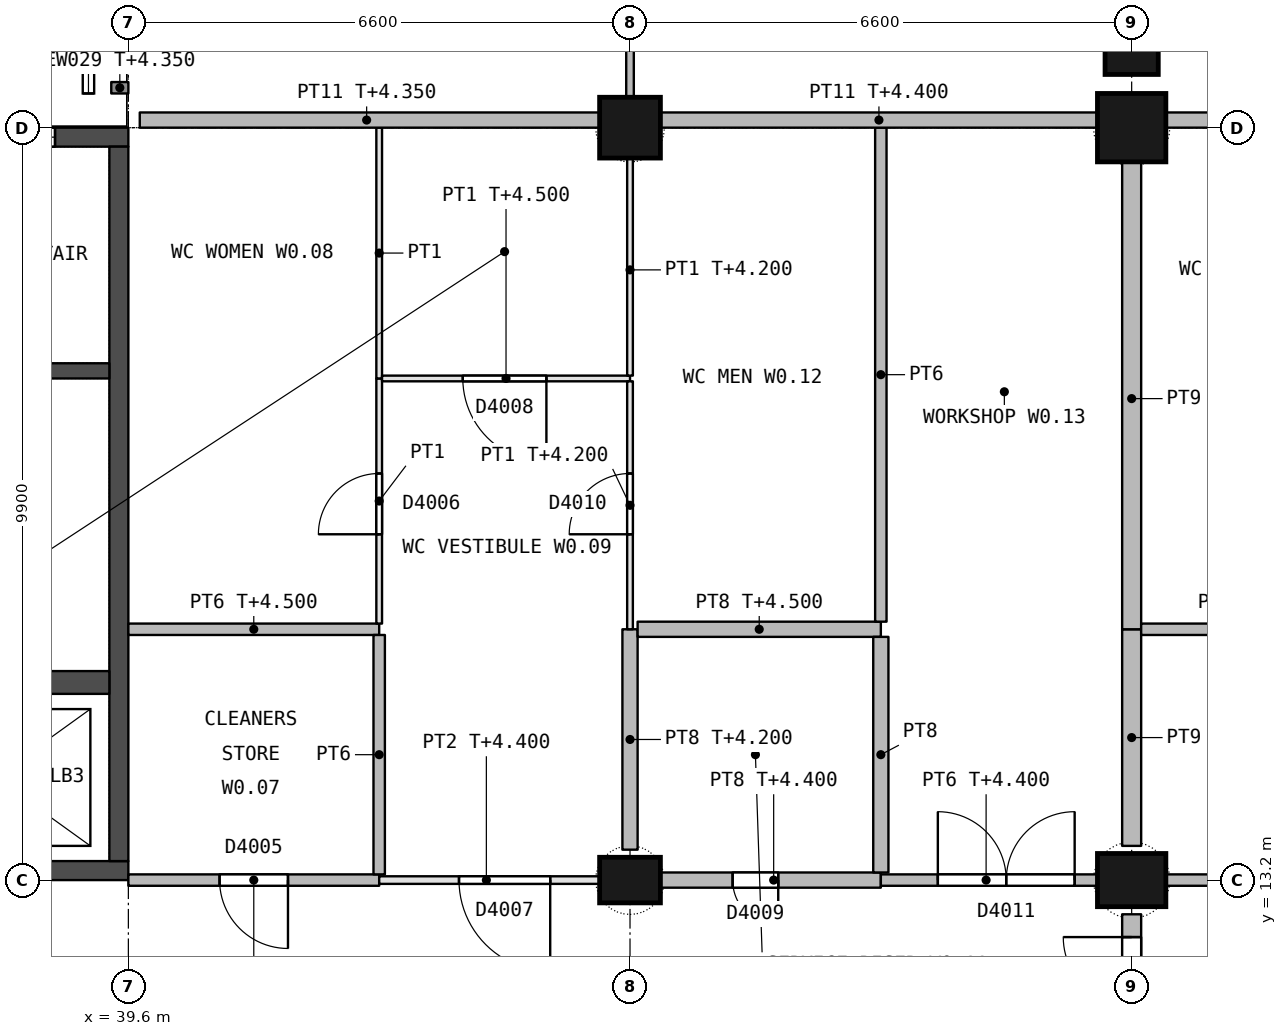
"""IFC4 building model, lengths in metres.
Left out: names, types, materials, properties, quantities, classifications, styles, units other than length and angle.
Written with IfcOpenShell. Run it as: python <this file> out.ifc"""

import sys

from ifc_helpers import new_model, si_unit, direction, frame, frame_2d, origin, origin_2d, place, context, subcontext, project, spatial, rectangle, extrude, element, fill, save


model = new_model("IFC4")
c1 = context("Model", 3, precision=1e-05, world=origin(), true_north=direction((0.0, 1.0)))
c2 = subcontext(c1, "Body", "Model", "MODEL_VIEW")
j1 = project(units=[si_unit("LENGTHUNIT", "METRE"), si_unit("PLANEANGLEUNIT", "RADIAN")], contexts=[c1])
p1 = place(None, origin())
s1 = spatial("IfcSite", under=j1, at=p1, CompositionType="ELEMENT")
p2 = place(p1, origin())
s2 = spatial("IfcBuilding", under=s1, at=p2, CompositionType="ELEMENT")
p3 = place(p2, origin())
s3 = spatial("IfcBuildingStorey", under=s2, at=p3, CompositionType="ELEMENT", Elevation=0.0)
p4 = place(p3, frame((46.2, 13.2, 0.0), z_axis=(0.0, 0.0, 1.0), x_axis=(1.0, 0.0, 0.0)))
e1 = element("IfcColumn", 1, at=p4, inside=s3, PredefinedType="COLUMN", context=c2, shape_type="SweptSolid", body=[
    extrude(rectangle(XDim=0.8, YDim=0.6, at=origin_2d()), origin(), (0.0, 0.0, 1.0), 5.4),
])
p5 = place(p3, frame((46.2, 23.1, 0.0), z_axis=(0.0, 0.0, 1.0), x_axis=(1.0, 0.0, 0.0)))
e2 = element("IfcColumn", 2, at=p5, inside=s3, PredefinedType="COLUMN", context=c2, shape_type="SweptSolid", body=[
    extrude(rectangle(XDim=0.8, YDim=0.8, at=origin_2d()), origin(), (0.0, 0.0, 1.0), 5.4),
])
p6 = place(p3, frame((52.8, 13.2, 0.0), z_axis=(0.0, 0.0, 1.0), x_axis=(1.0, 0.0, 0.0)))
e3 = element("IfcColumn", 3, at=p6, inside=s3, PredefinedType="COLUMN", context=c2, shape_type="SweptSolid", body=[
    extrude(rectangle(XDim=0.9, YDim=0.7, at=origin_2d()), origin(), (0.0, 0.0, 1.0), 5.4),
])
p7 = place(p3, frame((52.8, 23.1, 0.0), z_axis=(0.0, 0.0, 1.0), x_axis=(1.0, 0.0, 0.0)))
e4 = element("IfcColumn", 4, at=p7, inside=s3, PredefinedType="COLUMN", context=c2, shape_type="SweptSolid", body=[
    extrude(rectangle(XDim=0.9, YDim=0.9, at=origin_2d()), origin(), (0.0, 0.0, 1.0), 5.4),
])
p8 = place(p3, frame((52.8, 24.15, 0.0), z_axis=(0.0, 0.0, 1.0), x_axis=(1.0, 0.0, 0.0)))
e5 = element("IfcColumn", 5, at=p8, inside=s3, PredefinedType="COLUMN", context=c2, shape_type="SweptSolid", body=[
    extrude(rectangle(XDim=0.7, YDim=0.7, at=origin_2d()), origin(), (0.0, 0.0, 1.0), 5.4),
])
p9 = place(p3, frame((33.0, 13.325, 0.0), z_axis=(0.0, 0.0, 1.0), x_axis=(1.0, 0.0, 0.0)))
e6 = element("IfcWall", 6, at=p9, inside=s3, PredefinedType="SHEAR", context=c2, shape_type="SweptSolid", body=[
    extrude(rectangle(XDim=6.6, YDim=0.25, at=frame_2d((3.3, 0.0))), origin(), (0.0, 0.0, 1.0), 5.1),
])
p10 = place(p9, frame((0.95, 0.0, 0.0)))
e7 = element("IfcOpeningElement", 7, at=p10, cuts=e6, PredefinedType="OPENING", context=c2, shape_type="SweptSolid", body=[
    extrude(rectangle(XDim=1.1, YDim=2.1, at=frame_2d((0.55, 1.05))), frame((0.0, 0.135, 0.0), z_axis=(0.0, -1.0, 0.0), x_axis=(1.0, 0.0, 0.0)), (0.0, 0.0, 1.0), 0.27),
])
p11 = place(p3, frame((33.0, 22.975, 0.0), z_axis=(0.0, 0.0, 1.0), x_axis=(1.0, 0.0, 0.0)))
e8 = element("IfcWall", 8, at=p11, inside=s3, PredefinedType="SHEAR", context=c2, shape_type="SweptSolid", body=[
    extrude(rectangle(XDim=6.6, YDim=0.25, at=frame_2d((3.3, 0.0))), origin(), (0.0, 0.0, 1.0), 5.1),
])
p12 = place(p11, frame((0.375, 0.0, 0.0)))
e9 = element("IfcOpeningElement", 9, at=p12, cuts=e8, PredefinedType="OPENING", context=c2, shape_type="SweptSolid", body=[
    extrude(rectangle(XDim=1.1, YDim=2.4, at=frame_2d((0.55, 1.2))), frame((0.0, 0.135, 0.0), z_axis=(0.0, -1.0, 0.0), x_axis=(1.0, 0.0, 0.0)), (0.0, 0.0, 1.0), 0.27),
])
p13 = place(p11, frame((4.735, 0.0, 2.05)))
e10 = element("IfcOpeningElement", 10, at=p13, cuts=e8, PredefinedType="OPENING", context=c2, shape_type="SweptSolid", body=[
    extrude(rectangle(XDim=0.9, YDim=1.2, at=frame_2d((0.45, 0.6))), frame((0.0, 0.135, 0.0), z_axis=(0.0, -1.0, 0.0), x_axis=(1.0, 0.0, 0.0)), (0.0, 0.0, 1.0), 0.27),
])
p14 = place(p3, frame((39.475, 13.45, 0.0), z_axis=(0.0, 0.0, 1.0), x_axis=(0.0, 1.0, 0.0)))
e11 = element("IfcWall", 11, at=p14, inside=s3, PredefinedType="SHEAR", context=c2, shape_type="SweptSolid", body=[
    extrude(rectangle(XDim=9.4, YDim=0.25, at=frame_2d((4.7, 0.0))), origin(), (0.0, 0.0, 1.0), 5.1),
])
p15 = place(p3, frame((33.25, 19.9, 0.0), z_axis=(0.0, 0.0, 1.0), x_axis=(1.0, 0.0, 0.0)))
e12 = element("IfcWall", 12, at=p15, inside=s3, PredefinedType="SHEAR", context=c2, shape_type="SweptSolid", body=[
    extrude(rectangle(XDim=6.1, YDim=0.2, at=frame_2d((3.05, 0.0))), origin(), (0.0, 0.0, 1.0), 5.1),
])
p16 = place(p15, frame((0.175, 0.0, 0.0)))
e13 = element("IfcOpeningElement", 13, at=p16, cuts=e12, PredefinedType="OPENING", context=c2, shape_type="SweptSolid", body=[
    extrude(rectangle(XDim=1.0, YDim=2.1, at=frame_2d((0.5, 1.05))), frame((0.0, 0.11, 0.0), z_axis=(0.0, -1.0, 0.0), x_axis=(1.0, 0.0, 0.0)), (0.0, 0.0, 1.0), 0.22),
])
p17 = place(p3, frame((36.55, 15.8, 0.0), z_axis=(0.0, 0.0, 1.0), x_axis=(1.0, 0.0, 0.0)))
e14 = element("IfcWall", 14, at=p17, inside=s3, PredefinedType="SHEAR", context=c2, shape_type="SweptSolid", body=[
    extrude(rectangle(XDim=2.8, YDim=0.3, at=frame_2d((1.4, 0.0))), origin(), (0.0, 0.0, 1.0), 5.1),
])
p18 = place(p3, frame((39.375, 23.625, 0.0), z_axis=(0.0, 0.0, 1.0), x_axis=(1.0, 0.0, 0.0)))
e15 = element("IfcWall", 15, at=p18, inside=s3, PredefinedType="STANDARD", context=c2, shape_type="SweptSolid", body=[
    extrude(rectangle(XDim=0.225, YDim=0.15, at=frame_2d((0.113, 0.0))), origin(), (0.0, 0.0, 1.0), 4.35),
])
p19 = place(p3, frame((42.9, 13.2, 0.0), z_axis=(0.0, 0.0, 1.0), x_axis=(-1.0, 0.0, 0.0)))
e16 = element("IfcWall", 16, at=p19, inside=s3, PredefinedType="PARTITIONING", context=c2, shape_type="SweptSolid", body=[
    extrude(rectangle(XDim=3.3, YDim=0.15, at=frame_2d((1.65, 0.0))), origin(), (0.0, 0.0, 1.0), 4.4),
])
p20 = place(p19, frame((1.2, 0.0, 0.0)))
e17 = element("IfcOpeningElement", 17, at=p20, cuts=e16, PredefinedType="OPENING", context=c2, shape_type="SweptSolid", body=[
    extrude(rectangle(XDim=0.9, YDim=2.1, at=frame_2d((0.45, 1.05))), frame((0.0, 0.085, 0.0), z_axis=(0.0, -1.0, 0.0), x_axis=(1.0, 0.0, 0.0)), (0.0, 0.0, 1.0), 0.17),
])
p21 = place(p3, frame((42.9, 13.2, 0.0), z_axis=(0.0, 0.0, 1.0), x_axis=(1.0, 0.0, 0.0)))
e18 = element("IfcWall", 18, at=p21, inside=s3, PredefinedType="PARTITIONING", context=c2, shape_type="SweptSolid", body=[
    extrude(rectangle(XDim=2.9, YDim=0.1, at=frame_2d((1.45, 0.0))), origin(), (0.0, 0.0, 1.0), 4.4),
])
p22 = place(p21, frame((1.05, 0.0, 0.0)))
e19 = element("IfcOpeningElement", 19, at=p22, cuts=e18, PredefinedType="OPENING", context=c2, shape_type="SweptSolid", body=[
    extrude(rectangle(XDim=1.2, YDim=2.1, at=frame_2d((0.6, 1.05))), frame((0.0, 0.06, 0.0), z_axis=(0.0, -1.0, 0.0), x_axis=(1.0, 0.0, 0.0)), (0.0, 0.0, 1.0), 0.12),
])
p23 = place(p3, frame((46.6, 13.2, 0.0), z_axis=(0.0, 0.0, 1.0), x_axis=(1.0, 0.0, 0.0)))
e20 = element("IfcWall", 20, at=p23, inside=s3, PredefinedType="PARTITIONING", context=c2, shape_type="SweptSolid", body=[
    extrude(rectangle(XDim=2.9, YDim=0.2, at=frame_2d((1.45, 0.0))), origin(), (0.0, 0.0, 1.0), 4.4),
])
p24 = place(p23, frame((0.95, 0.0, 0.0)))
e21 = element("IfcOpeningElement", 21, at=p24, cuts=e20, PredefinedType="OPENING", context=c2, shape_type="SweptSolid", body=[
    extrude(rectangle(XDim=0.6, YDim=2.1, at=frame_2d((0.3, 1.05))), frame((0.0, 0.11, 0.0), z_axis=(0.0, -1.0, 0.0), x_axis=(1.0, 0.0, 0.0)), (0.0, 0.0, 1.0), 0.22),
])
p25 = place(p3, frame((49.5, 13.2, 0.0), z_axis=(0.0, 0.0, 1.0), x_axis=(1.0, 0.0, 0.0)))
e22 = element("IfcWall", 22, at=p25, inside=s3, PredefinedType="PARTITIONING", context=c2, shape_type="SweptSolid", body=[
    extrude(rectangle(XDim=2.85, YDim=0.15, at=frame_2d((1.425, 0.0))), origin(), (0.0, 0.0, 1.0), 4.4),
])
p26 = place(p25, frame((0.75, 0.0, 0.0)))
e23 = element("IfcOpeningElement", 23, at=p26, cuts=e22, PredefinedType="OPENING", context=c2, shape_type="SweptSolid", body=[
    extrude(rectangle(XDim=1.8, YDim=2.4, at=frame_2d((0.9, 1.2))), frame((0.0, 0.085, 0.0), z_axis=(0.0, -1.0, 0.0), x_axis=(1.0, 0.0, 0.0)), (0.0, 0.0, 1.0), 0.17),
])
p27 = place(p3, frame((52.8, 10.35, 0.0), z_axis=(0.0, 0.0, 1.0), x_axis=(0.0, 1.0, 0.0)))
e24 = element("IfcWall", 24, at=p27, inside=s3, PredefinedType="PARTITIONING", context=c2, shape_type="SweptSolid", body=[
    extrude(rectangle(XDim=2.4, YDim=0.25, at=frame_2d((1.2, 0.0))), origin(), (0.0, 0.0, 1.0), 4.5),
])
p28 = place(p27, frame((0.3, 0.0, 0.0)))
e25 = element("IfcOpeningElement", 25, at=p28, cuts=e24, PredefinedType="OPENING", context=c2, shape_type="SweptSolid", body=[
    extrude(rectangle(XDim=1.8, YDim=2.1, at=frame_2d((0.9, 1.05))), frame((0.0, 0.135, 0.0), z_axis=(0.0, -1.0, 0.0), x_axis=(1.0, 0.0, 0.0)), (0.0, 0.0, 1.0), 0.27),
])
p29 = place(p3, frame((42.9, 16.5, 0.0), z_axis=(0.0, 0.0, 1.0), x_axis=(-1.0, 0.0, 0.0)))
e26 = element("IfcWall", 26, at=p29, inside=s3, PredefinedType="PARTITIONING", context=c2, shape_type="SweptSolid", body=[
    extrude(rectangle(XDim=3.3, YDim=0.15, at=frame_2d((1.65, 0.0))), origin(), (0.0, 0.0, 1.0), 4.5),
])
p30 = place(p3, frame((42.9, 13.275, 0.0), z_axis=(0.0, 0.0, 1.0), x_axis=(0.0, 1.0, 0.0)))
e27 = element("IfcWall", 27, at=p30, inside=s3, PredefinedType="PARTITIONING", context=c2, shape_type="SweptSolid", body=[
    extrude(rectangle(XDim=3.15, YDim=0.15, at=frame_2d((1.575, 0.0))), origin(), (0.0, 0.0, 1.0), 5.1),
])
p31 = place(p3, frame((42.9, 16.575, 0.0), z_axis=(0.0, 0.0, 1.0), x_axis=(0.0, 1.0, 0.0)))
e28 = element("IfcWall", 28, at=p31, inside=s3, PredefinedType="PARTITIONING", context=c2, shape_type="SweptSolid", body=[
    extrude(rectangle(XDim=3.225, YDim=0.075, at=frame_2d((1.613, 0.0))), origin(), (0.0, 0.0, 1.0), 5.1),
])
p32 = place(p31, frame((1.175, 0.0, 0.0)))
e29 = element("IfcOpeningElement", 29, at=p32, cuts=e28, PredefinedType="OPENING", context=c2, shape_type="SweptSolid", body=[
    extrude(rectangle(XDim=0.8, YDim=2.1, at=frame_2d((0.4, 1.05))), frame((0.0, 0.047, 0.0), z_axis=(0.0, -1.0, 0.0), x_axis=(1.0, 0.0, 0.0)), (0.0, 0.0, 1.0), 0.095),
])
p33 = place(p3, frame((42.9, 19.8, 0.0), z_axis=(0.0, 0.0, 1.0), x_axis=(0.0, 1.0, 0.0)))
e30 = element("IfcWall", 30, at=p33, inside=s3, PredefinedType="PARTITIONING", context=c2, shape_type="SweptSolid", body=[
    extrude(rectangle(XDim=3.3, YDim=0.075, at=frame_2d((1.65, 0.0))), origin(), (0.0, 0.0, 1.0), 5.1),
])
p34 = place(p3, frame((42.938, 19.8, 0.0), z_axis=(0.0, 0.0, 1.0), x_axis=(1.0, 0.0, 0.0)))
e31 = element("IfcWall", 31, at=p34, inside=s3, PredefinedType="PARTITIONING", context=c2, shape_type="SweptSolid", body=[
    extrude(rectangle(XDim=3.262, YDim=0.075, at=frame_2d((1.631, 0.0))), origin(), (0.0, 0.0, 1.0), 4.5),
])
p35 = place(p34, frame((1.062, 0.0, 0.0)))
e32 = element("IfcOpeningElement", 32, at=p35, cuts=e31, PredefinedType="OPENING", context=c2, shape_type="SweptSolid", body=[
    extrude(rectangle(XDim=1.1, YDim=2.1, at=frame_2d((0.55, 1.05))), frame((0.0, 0.047, 0.0), z_axis=(0.0, -1.0, 0.0), x_axis=(1.0, 0.0, 0.0)), (0.0, 0.0, 1.0), 0.095),
])
p36 = place(p3, frame((46.2, 13.6, 0.0), z_axis=(0.0, 0.0, 1.0), x_axis=(0.0, 1.0, 0.0)))
e33 = element("IfcWall", 33, at=p36, inside=s3, PredefinedType="PARTITIONING", context=c2, shape_type="SweptSolid", body=[
    extrude(rectangle(XDim=2.9, YDim=0.2, at=frame_2d((1.45, 0.0))), origin(), (0.0, 0.0, 1.0), 4.2),
])
p37 = place(p3, frame((46.2, 19.762, 0.0), z_axis=(0.0, 0.0, 1.0), x_axis=(0.0, -1.0, 0.0)))
e34 = element("IfcWall", 34, at=p37, inside=s3, PredefinedType="PARTITIONING", context=c2, shape_type="SweptSolid", body=[
    extrude(rectangle(XDim=3.262, YDim=0.075, at=frame_2d((1.631, 0.0))), origin(), (0.0, 0.0, 1.0), 4.2),
])
p38 = place(p37, frame((1.212, 0.0, 0.0)))
e35 = element("IfcOpeningElement", 35, at=p38, cuts=e34, PredefinedType="OPENING", context=c2, shape_type="SweptSolid", body=[
    extrude(rectangle(XDim=0.8, YDim=2.1, at=frame_2d((0.4, 1.05))), frame((0.0, 0.047, 0.0), z_axis=(0.0, -1.0, 0.0), x_axis=(1.0, 0.0, 0.0)), (0.0, 0.0, 1.0), 0.095),
])
p39 = place(p3, frame((46.2, 19.837, 0.0), z_axis=(0.0, 0.0, 1.0), x_axis=(0.0, 1.0, 0.0)))
e36 = element("IfcWall", 36, at=p39, inside=s3, PredefinedType="PARTITIONING", context=c2, shape_type="SweptSolid", body=[
    extrude(rectangle(XDim=2.863, YDim=0.075, at=frame_2d((1.431, 0.0))), origin(), (0.0, 0.0, 1.0), 4.2),
])
p40 = place(p3, frame((49.5, 16.5, 0.0), z_axis=(0.0, 0.0, 1.0), x_axis=(-1.0, 0.0, 0.0)))
e37 = element("IfcWall", 37, at=p40, inside=s3, PredefinedType="PARTITIONING", context=c2, shape_type="SweptSolid", body=[
    extrude(rectangle(XDim=3.2, YDim=0.2, at=frame_2d((1.6, 0.0))), origin(), (0.0, 0.0, 1.0), 4.5),
])
p41 = place(p3, frame((49.5, 13.3, 0.0), z_axis=(0.0, 0.0, 1.0), x_axis=(0.0, 1.0, 0.0)))
e38 = element("IfcWall", 38, at=p41, inside=s3, PredefinedType="PARTITIONING", context=c2, shape_type="SweptSolid", body=[
    extrude(rectangle(XDim=3.1, YDim=0.2, at=frame_2d((1.55, 0.0))), origin(), (0.0, 0.0, 1.0), 5.1),
])
p42 = place(p3, frame((49.5, 16.6, 0.0), z_axis=(0.0, 0.0, 1.0), x_axis=(0.0, 1.0, 0.0)))
e39 = element("IfcWall", 39, at=p42, inside=s3, PredefinedType="PARTITIONING", context=c2, shape_type="SweptSolid", body=[
    extrude(rectangle(XDim=6.5, YDim=0.15, at=frame_2d((3.25, 0.0))), origin(), (0.0, 0.0, 1.0), 5.1),
])
p43 = place(p3, frame((52.8, 13.65, 0.0), z_axis=(0.0, 0.0, 1.0), x_axis=(0.0, 1.0, 0.0)))
e40 = element("IfcWall", 40, at=p43, inside=s3, PredefinedType="PARTITIONING", context=c2, shape_type="SweptSolid", body=[
    extrude(rectangle(XDim=2.85, YDim=0.25, at=frame_2d((1.425, 0.0))), origin(), (0.0, 0.0, 1.0), 4.2),
])
p44 = place(p3, frame((52.8, 16.5, 0.0), z_axis=(0.0, 0.0, 1.0), x_axis=(0.0, 1.0, 0.0)))
e41 = element("IfcWall", 41, at=p44, inside=s3, PredefinedType="PARTITIONING", context=c2, shape_type="SweptSolid", body=[
    extrude(rectangle(XDim=6.15, YDim=0.25, at=frame_2d((3.075, 0.0))), origin(), (0.0, 0.0, 1.0), 4.2),
])
p45 = place(p3, frame((56.1, 13.2, 0.0), z_axis=(0.0, 0.0, 1.0), x_axis=(-1.0, 0.0, 0.0)))
e42 = element("IfcWall", 42, at=p45, inside=s3, PredefinedType="PARTITIONING", context=c2, shape_type="SweptSolid", body=[
    extrude(rectangle(XDim=2.85, YDim=0.15, at=frame_2d((1.425, 0.0))), origin(), (0.0, 0.0, 1.0), 4.4),
])
p46 = place(p45, frame((1.2, 0.0, 0.0)))
e43 = element("IfcOpeningElement", 43, at=p46, cuts=e42, PredefinedType="OPENING", context=c2, shape_type="SweptSolid", body=[
    extrude(rectangle(XDim=0.9, YDim=2.1, at=frame_2d((0.45, 1.05))), frame((0.0, 0.085, 0.0), z_axis=(0.0, -1.0, 0.0), x_axis=(1.0, 0.0, 0.0)), (0.0, 0.0, 1.0), 0.17),
])
p47 = place(p3, frame((56.1, 16.5, 0.0), z_axis=(0.0, 0.0, 1.0), x_axis=(-1.0, 0.0, 0.0)))
e44 = element("IfcWall", 44, at=p47, inside=s3, PredefinedType="PARTITIONING", context=c2, shape_type="SweptSolid", body=[
    extrude(rectangle(XDim=3.175, YDim=0.15, at=frame_2d((1.587, 0.0))), origin(), (0.0, 0.0, 1.0), 4.5),
])
p48 = place(p3, frame((39.75, 23.2, 0.0), z_axis=(0.0, 0.0, 1.0), x_axis=(1.0, 0.0, 0.0)))
e45 = element("IfcWall", 45, at=p48, inside=s3, PredefinedType="PARTITIONING", context=c2, shape_type="SweptSolid", body=[
    extrude(rectangle(XDim=6.05, YDim=0.2, at=frame_2d((3.025, 0.0))), origin(), (0.0, 0.0, 1.0), 4.35),
])
p49 = place(p3, frame((46.6, 23.2, 0.0), z_axis=(0.0, 0.0, 1.0), x_axis=(1.0, 0.0, 0.0)))
e46 = element("IfcWall", 46, at=p49, inside=s3, PredefinedType="PARTITIONING", context=c2, shape_type="SweptSolid", body=[
    extrude(rectangle(XDim=5.75, YDim=0.2, at=frame_2d((2.875, 0.0))), origin(), (0.0, 0.0, 1.0), 4.4),
])
p50 = place(p3, frame((53.25, 23.2, 0.0), z_axis=(0.0, 0.0, 1.0), x_axis=(1.0, 0.0, 0.0)))
e47 = element("IfcWall", 47, at=p50, inside=s3, PredefinedType="PARTITIONING", context=c2, shape_type="SweptSolid", body=[
    extrude(rectangle(XDim=5.7, YDim=0.2, at=frame_2d((2.85, 0.0))), origin(), (0.0, 0.0, 1.0), 4.4),
])
p51 = place(p3, frame((46.2, 29.3, 0.0), z_axis=(0.0, 0.0, 1.0), x_axis=(0.0, -1.0, 0.0)))
e48 = element("IfcWall", 48, at=p51, inside=s3, PredefinedType="PARTITIONING", context=c2, shape_type="SweptSolid", body=[
    extrude(rectangle(XDim=5.8, YDim=0.1, at=frame_2d((2.9, 0.0))), origin(), (0.0, 0.0, 1.0), 4.35),
])
p52 = place(p51, frame((0.1, 0.0, 0.0)))
e49 = element("IfcOpeningElement", 49, at=p52, cuts=e48, PredefinedType="OPENING", context=c2, shape_type="SweptSolid", body=[
    extrude(rectangle(XDim=1.8, YDim=2.4, at=frame_2d((0.9, 1.2))), frame((0.0, 0.06, 0.0), z_axis=(0.0, -1.0, 0.0), x_axis=(1.0, 0.0, 0.0)), (0.0, 0.0, 1.0), 0.12),
])
p53 = place(p13, origin())
e50 = element("IfcWindow", 50, at=p53, inside=s3, PartitioningType="SINGLE_PANEL", PredefinedType="WINDOW", context=c2, shape_type="SweptSolid", body=[
    extrude(rectangle(XDim=0.9, YDim=1.2, at=frame_2d((0.45, 0.6))), frame((0.0, 0.03, 0.0), z_axis=(0.0, -1.0, 0.0), x_axis=(1.0, 0.0, 0.0)), (0.0, 0.0, 1.0), 0.06),
])
fill(e10, e50)
p54 = place(p28, origin())
e51 = element("IfcDoor", 51, at=p54, inside=s3, OperationType="DOUBLE_DOOR_SINGLE_SWING", PredefinedType="DOOR", context=c2, shape_type="SweptSolid", body=[
    extrude(rectangle(XDim=1.8, YDim=2.1, at=frame_2d((0.9, 1.05))), frame((0.0, 0.03, 0.0), z_axis=(0.0, -1.0, 0.0), x_axis=(1.0, 0.0, 0.0)), (0.0, 0.0, 1.0), 0.06),
])
fill(e25, e51)
p55 = place(p20, origin())
e52 = element("IfcDoor", 52, at=p55, inside=s3, OperationType="SINGLE_SWING_LEFT", PredefinedType="DOOR", context=c2, shape_type="SweptSolid", body=[
    extrude(rectangle(XDim=0.9, YDim=2.1, at=frame_2d((0.45, 1.05))), frame((0.0, 0.027, 0.0), z_axis=(0.0, -1.0, 0.0), x_axis=(1.0, 0.0, 0.0)), (0.0, 0.0, 1.0), 0.054),
])
fill(e17, e52)
p56 = place(p32, origin())
e53 = element("IfcDoor", 53, at=p56, inside=s3, OperationType="SINGLE_SWING_LEFT", PredefinedType="DOOR", context=c2, shape_type="SweptSolid", body=[
    extrude(rectangle(XDim=0.8, YDim=2.1, at=frame_2d((0.4, 1.05))), frame((0.0, 0.022, 0.0), z_axis=(0.0, -1.0, 0.0), x_axis=(1.0, 0.0, 0.0)), (0.0, 0.0, 1.0), 0.044),
])
fill(e29, e53)
p57 = place(p22, origin())
e54 = element("IfcDoor", 54, at=p57, inside=s3, OperationType="SINGLE_SWING_RIGHT", PredefinedType="DOOR", context=c2, shape_type="SweptSolid", body=[
    extrude(rectangle(XDim=1.2, YDim=2.1, at=frame_2d((0.6, 1.05))), frame((0.0, 0.022, 0.0), z_axis=(0.0, -1.0, 0.0), x_axis=(1.0, 0.0, 0.0)), (0.0, 0.0, 1.0), 0.044),
])
fill(e19, e54)
p58 = place(p35, origin())
e55 = element("IfcDoor", 55, at=p58, inside=s3, OperationType="SINGLE_SWING_RIGHT", PredefinedType="DOOR", context=c2, shape_type="SweptSolid", body=[
    extrude(rectangle(XDim=1.1, YDim=2.1, at=frame_2d((0.55, 1.05))), frame((0.0, 0.022, 0.0), z_axis=(0.0, -1.0, 0.0), x_axis=(1.0, 0.0, 0.0)), (0.0, 0.0, 1.0), 0.044),
])
fill(e32, e55)
p59 = place(p24, origin())
e56 = element("IfcDoor", 56, at=p59, inside=s3, OperationType="SINGLE_SWING_RIGHT", PredefinedType="DOOR", context=c2, shape_type="SweptSolid", body=[
    extrude(rectangle(XDim=0.6, YDim=2.1, at=frame_2d((0.3, 1.05))), frame((0.0, 0.03, 0.0), z_axis=(0.0, -1.0, 0.0), x_axis=(1.0, 0.0, 0.0)), (0.0, 0.0, 1.0), 0.06),
])
fill(e21, e56)
p60 = place(p38, origin())
e57 = element("IfcDoor", 57, at=p60, inside=s3, OperationType="SINGLE_SWING_RIGHT", PredefinedType="DOOR", context=c2, shape_type="SweptSolid", body=[
    extrude(rectangle(XDim=0.8, YDim=2.1, at=frame_2d((0.4, 1.05))), frame((0.0, 0.022, 0.0), z_axis=(0.0, -1.0, 0.0), x_axis=(1.0, 0.0, 0.0)), (0.0, 0.0, 1.0), 0.044),
])
fill(e35, e57)
p61 = place(p26, origin())
e58 = element("IfcDoor", 58, at=p61, inside=s3, OperationType="DOUBLE_DOOR_SINGLE_SWING", PredefinedType="DOOR", context=c2, shape_type="SweptSolid", body=[
    extrude(rectangle(XDim=1.8, YDim=2.4, at=frame_2d((0.9, 1.2))), frame((0.0, 0.027, 0.0), z_axis=(0.0, -1.0, 0.0), x_axis=(1.0, 0.0, 0.0)), (0.0, 0.0, 1.0), 0.054),
])
fill(e23, e58)
save(model, sys.argv[1])
